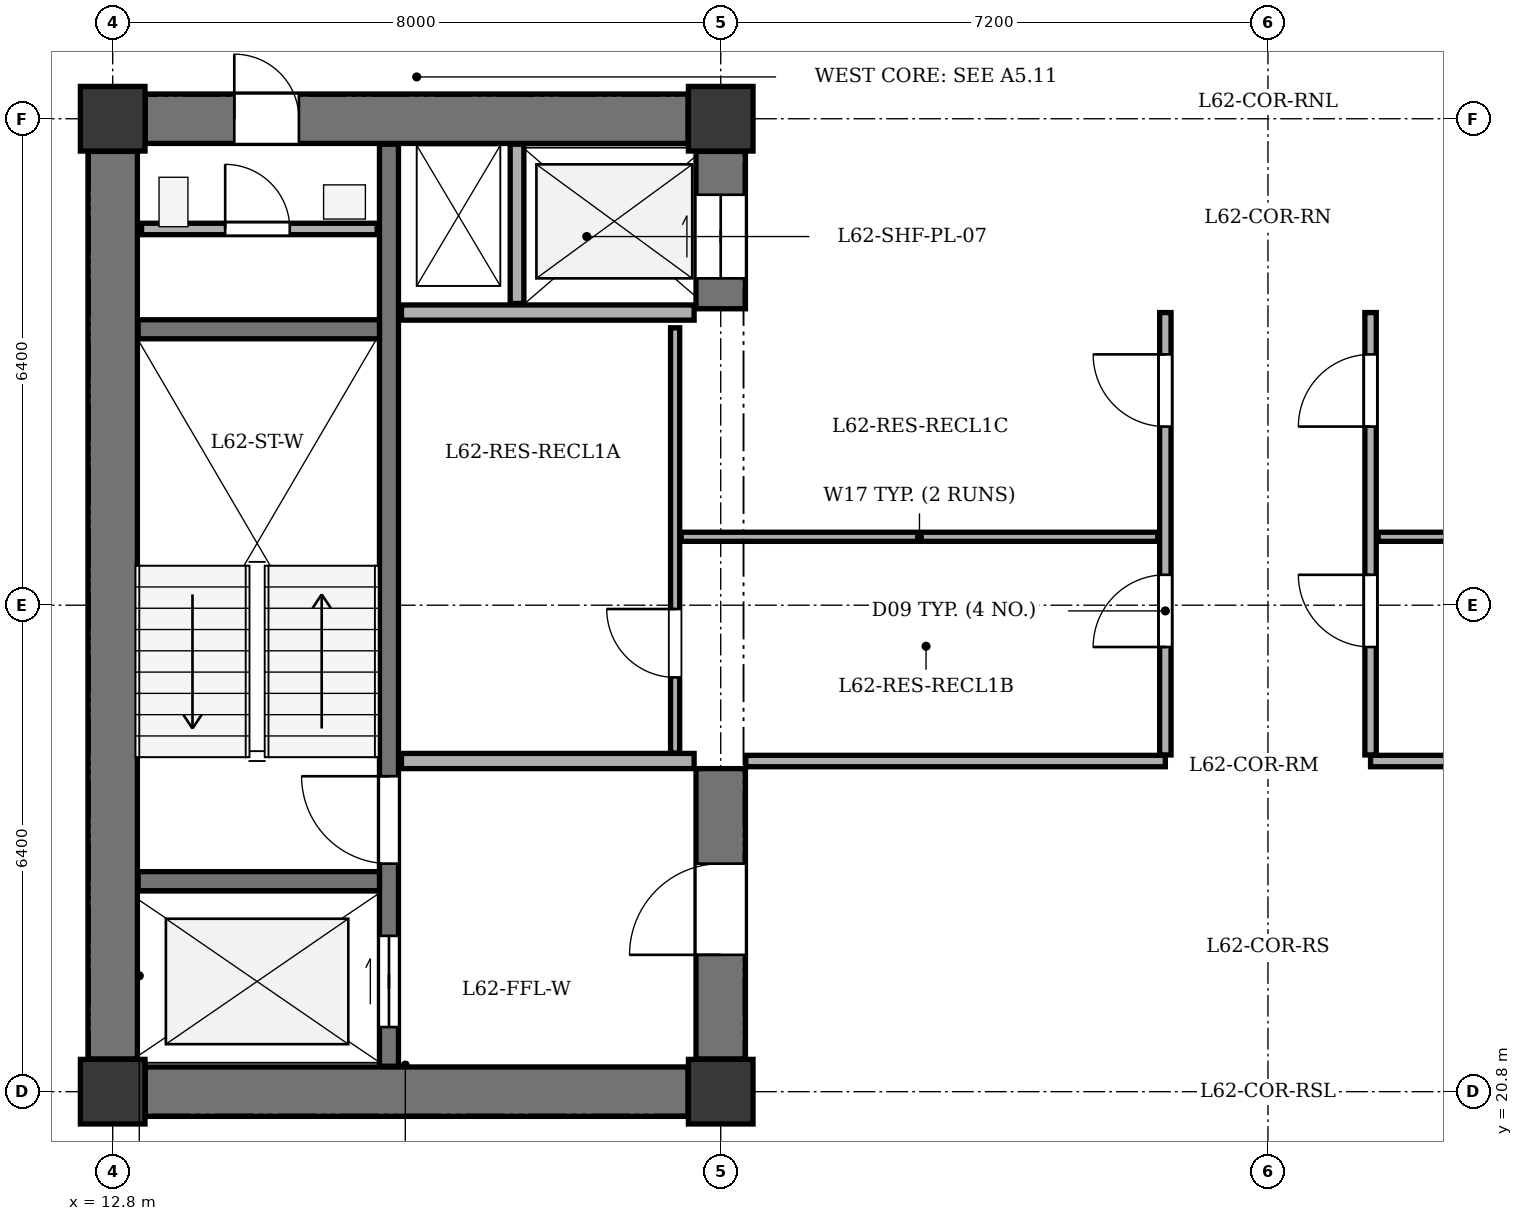
"""IFC4 building model, lengths in metres.
Left out: names, types, materials, properties, quantities, classifications, styles, units other than length and angle.
Written with IfcOpenShell. Run it as: python <this file> out.ifc"""

import sys

from ifc_helpers import new_model, si_unit, direction, frame, frame_2d, origin, origin_2d, place, context, subcontext, project, spatial, rectangle, extrude, element, fill, save


model = new_model("IFC4")
c1 = context("Model", 3, precision=1e-05, world=origin(), true_north=direction((0.0, 1.0)))
c2 = subcontext(c1, "Body", "Model", "MODEL_VIEW")
j1 = project(units=[si_unit("LENGTHUNIT", "METRE"), si_unit("PLANEANGLEUNIT", "RADIAN")], contexts=[c1])
p1 = place(None, origin())
s1 = spatial("IfcSite", under=j1, at=p1, CompositionType="ELEMENT")
p2 = place(p1, origin())
s2 = spatial("IfcBuilding", under=s1, at=p2, CompositionType="ELEMENT")
p3 = place(p2, frame((0.0, 0.0, 238.1)))
s3 = spatial("IfcBuildingStorey", under=s2, at=p3, CompositionType="ELEMENT", Elevation=238.1)
for number, where, z_axis, x_axis in (
    (1, (12.8, 20.8, 0.0), (0.0, 0.0, 1.0), (1.0, 0.0, 0.0)),
    (2, (20.8, 20.8, 0.0), (0.0, 0.0, 1.0), (1.0, 0.0, 0.0)),
    (3, (12.8, 33.6, 0.0), (0.0, 0.0, 1.0), (1.0, 0.0, 0.0)),
    (4, (20.8, 33.6, 0.0), (0.0, 0.0, 1.0), (1.0, 0.0, 0.0)),
):
    element("IfcColumn", number, at=place(p3, frame(where, z_axis=z_axis, x_axis=x_axis)), inside=s3, PredefinedType="COLUMN", context=c2, shape_type="SweptSolid", body=[
        extrude(rectangle(XDim=0.85, YDim=0.85, at=origin_2d()), origin(), (0.0, 0.0, 1.0), 3.4),
    ])
p4 = place(p3, frame((12.8, 21.23, 0.0), z_axis=(0.0, 0.0, 1.0), x_axis=(0.0, 1.0, 0.0)))
e5 = element("IfcWall", 5, at=p4, inside=s3, PredefinedType="SHEAR", context=c2, shape_type="SweptSolid", body=[
    extrude(rectangle(XDim=11.94, YDim=0.65, at=frame_2d((5.97, 0.0))), origin(), (0.0, 0.0, 1.0), 3.1),
])
p5 = place(p3, frame((13.23, 20.8, 0.0), z_axis=(0.0, 0.0, 1.0), x_axis=(1.0, 0.0, 0.0)))
e6 = element("IfcWall", 6, at=p5, inside=s3, PredefinedType="SHEAR", context=c2, shape_type="SweptSolid", body=[
    extrude(rectangle(XDim=7.14, YDim=0.65, at=frame_2d((3.57, 0.0))), origin(), (0.0, 0.0, 1.0), 3.1),
])
p6 = place(p3, frame((13.23, 33.6, 0.0), z_axis=(0.0, 0.0, 1.0), x_axis=(1.0, 0.0, 0.0)))
e7 = element("IfcWall", 7, at=p6, inside=s3, PredefinedType="SHEAR", context=c2, shape_type="SweptSolid", body=[
    extrude(rectangle(XDim=7.14, YDim=0.65, at=frame_2d((3.57, 0.0))), origin(), (0.0, 0.0, 1.0), 3.1),
])
p7 = place(p6, frame((1.17, 0.0, 0.0)))
e8 = element("IfcOpeningElement", 8, at=p7, cuts=e7, PredefinedType="OPENING", context=c2, shape_type="SweptSolid", body=[
    extrude(rectangle(XDim=0.85, YDim=2.02, at=frame_2d((0.425, 1.01))), frame((0.0, 0.335, 0.0), z_axis=(0.0, -1.0, 0.0), x_axis=(1.0, 0.0, 0.0)), (0.0, 0.0, 1.0), 0.67),
])
p8 = place(p3, frame((20.8, 21.23, 0.0), z_axis=(0.0, 0.0, 1.0), x_axis=(0.0, 1.0, 0.0)))
e9 = element("IfcWall", 9, at=p8, inside=s3, PredefinedType="SHEAR", context=c2, shape_type="SweptSolid", body=[
    extrude(rectangle(XDim=3.82, YDim=0.65, at=frame_2d((1.91, 0.0))), origin(), (0.0, 0.0, 1.0), 3.1),
])
p9 = place(p8, frame((1.37, 0.0, 0.0)))
e10 = element("IfcOpeningElement", 10, at=p9, cuts=e9, PredefinedType="OPENING", context=c2, shape_type="SweptSolid", body=[
    extrude(rectangle(XDim=1.2, YDim=2.15, at=frame_2d((0.6, 1.075))), frame((0.0, 0.335, 0.0), z_axis=(0.0, -1.0, 0.0), x_axis=(1.0, 0.0, 0.0)), (0.0, 0.0, 1.0), 0.67),
])
p10 = place(p3, frame((20.8, 31.1, 0.0), z_axis=(0.0, 0.0, 1.0), x_axis=(0.0, 1.0, 0.0)))
e11 = element("IfcWall", 11, at=p10, inside=s3, PredefinedType="SHEAR", context=c2, shape_type="SweptSolid", body=[
    extrude(rectangle(XDim=2.07, YDim=0.65, at=frame_2d((1.035, 0.0))), origin(), (0.0, 0.0, 1.0), 3.1),
])
p11 = place(p10, frame((0.4, 0.0, 0.0)))
e12 = element("IfcOpeningElement", 12, at=p11, cuts=e11, PredefinedType="OPENING", context=c2, shape_type="SweptSolid", body=[
    extrude(rectangle(XDim=1.1, YDim=2.1, at=frame_2d((0.55, 1.05))), frame((0.0, 0.335, 0.0), z_axis=(0.0, -1.0, 0.0), x_axis=(1.0, 0.0, 0.0)), (0.0, 0.0, 1.0), 0.67),
])
p12 = place(p3, frame((16.435, 21.135, 0.0), z_axis=(0.0, 0.0, 1.0), x_axis=(0.0, 1.0, 0.0)))
e13 = element("IfcWall", 13, at=p12, inside=s3, PredefinedType="SHEAR", context=c2, shape_type="SweptSolid", body=[
    extrude(rectangle(XDim=12.13, YDim=0.25, at=frame_2d((6.065, 0.0))), origin(), (0.0, 0.0, 1.0), 3.1),
])
p13 = place(p12, frame((0.515, 0.0, 0.0)))
e14 = element("IfcOpeningElement", 14, at=p13, cuts=e13, PredefinedType="OPENING", context=c2, shape_type="SweptSolid", body=[
    extrude(rectangle(XDim=1.2, YDim=2.15, at=frame_2d((0.6, 1.075))), frame((0.0, 0.135, 0.0), z_axis=(0.0, -1.0, 0.0), x_axis=(1.0, 0.0, 0.0)), (0.0, 0.0, 1.0), 0.27),
])
p14 = place(p12, frame((2.665, 0.0, 0.0)))
e15 = element("IfcOpeningElement", 15, at=p14, cuts=e13, PredefinedType="OPENING", context=c2, shape_type="SweptSolid", body=[
    extrude(rectangle(XDim=1.15, YDim=2.15, at=frame_2d((0.575, 1.075))), frame((0.0, 0.135, 0.0), z_axis=(0.0, -1.0, 0.0), x_axis=(1.0, 0.0, 0.0)), (0.0, 0.0, 1.0), 0.27),
])
for number, where, z_axis, x_axis in (
    (16, (13.135, 23.57, 0.0), (0.0, 0.0, 1.0), (1.0, 0.0, 0.0)),
    (17, (13.135, 30.83, 0.0), (0.0, 0.0, 1.0), (1.0, 0.0, 0.0)),
):
    element("IfcWall", number, at=place(p3, frame(where, z_axis=z_axis, x_axis=x_axis)), inside=s3, PredefinedType="SHEAR", context=c2, shape_type="SweptSolid", body=[
        extrude(rectangle(XDim=3.175, YDim=0.25, at=frame_2d((1.587, 0.0))), origin(), (0.0, 0.0, 1.0), 3.1),
    ])
for number, where, z_axis, x_axis in (
    (18, (16.6, 25.15, 0.0), (0.0, 0.0, 1.0), (1.0, 0.0, 0.0)),
    (19, (16.6, 31.05, 0.0), (0.0, 0.0, 1.0), (1.0, 0.0, 0.0)),
):
    element("IfcWall", number, at=place(p3, frame(where, z_axis=z_axis, x_axis=x_axis)), inside=s3, PredefinedType="SOLIDWALL", context=c2, shape_type="SweptSolid", body=[
        extrude(rectangle(XDim=3.85, YDim=0.2, at=frame_2d((1.925, 0.0))), origin(), (0.0, 0.0, 1.0), 3.1),
    ])
p15 = place(p3, frame((18.12, 31.17, 0.0), z_axis=(0.0, 0.0, 1.0), x_axis=(0.0, 1.0, 0.0)))
e20 = element("IfcWall", 20, at=p15, inside=s3, PredefinedType="PARTITIONING", context=c2, shape_type="SweptSolid", body=[
    extrude(rectangle(XDim=2.095, YDim=0.18, at=frame_2d((1.047, 0.0))), origin(), (0.0, 0.0, 1.0), 3.1),
])
p16 = place(p3, frame((13.18, 32.15, 0.0), z_axis=(0.0, 0.0, 1.0), x_axis=(1.0, 0.0, 0.0)))
e21 = element("IfcWall", 21, at=p16, inside=s3, PredefinedType="PARTITIONING", context=c2, shape_type="SweptSolid", body=[
    extrude(rectangle(XDim=3.1, YDim=0.15, at=frame_2d((1.55, 0.0))), origin(), (0.0, 0.0, 1.0), 3.1),
])
p17 = place(p16, frame((1.1, 0.0, 0.0)))
e22 = element("IfcOpeningElement", 22, at=p17, cuts=e21, PredefinedType="OPENING", context=c2, shape_type="SweptSolid", body=[
    extrude(rectangle(XDim=0.85, YDim=2.02, at=frame_2d((0.425, 1.01))), frame((0.0, 0.085, 0.0), z_axis=(0.0, -1.0, 0.0), x_axis=(1.0, 0.0, 0.0)), (0.0, 0.0, 1.0), 0.17),
])
for number, where, z_axis, x_axis in (
    (23, (21.13, 25.15, 0.0), (0.0, 0.0, 1.0), (1.0, 0.0, 0.0)),
    (24, (29.35, 25.15, 0.0), (0.0, 0.0, 1.0), (1.0, 0.0, 0.0)),
):
    element("IfcWall", number, at=place(p3, frame(where, z_axis=z_axis, x_axis=x_axis)), inside=s3, PredefinedType="PARTITIONING", context=c2, shape_type="SweptSolid", body=[
        extrude(rectangle(XDim=5.52, YDim=0.15, at=frame_2d((2.76, 0.0))), origin(), (0.0, 0.0, 1.0), 3.1),
    ])
p18 = place(p3, frame((26.65, 25.23, 0.0), z_axis=(0.0, 0.0, 1.0), x_axis=(0.0, 1.0, 0.0)))
e25 = element("IfcWall", 25, at=p18, inside=s3, PredefinedType="PARTITIONING", context=c2, shape_type="SweptSolid", body=[
    extrude(rectangle(XDim=5.82, YDim=0.15, at=frame_2d((2.91, 0.0))), origin(), (0.0, 0.0, 1.0), 3.1),
])
p19 = place(p18, frame((1.42, 0.0, 0.0)))
e26 = element("IfcOpeningElement", 26, at=p19, cuts=e25, PredefinedType="OPENING", context=c2, shape_type="SweptSolid", body=[
    extrude(rectangle(XDim=0.95, YDim=2.1, at=frame_2d((0.475, 1.05))), frame((0.0, 0.085, 0.0), z_axis=(0.0, -1.0, 0.0), x_axis=(1.0, 0.0, 0.0)), (0.0, 0.0, 1.0), 0.17),
])
p20 = place(p18, frame((4.32, 0.0, 0.0)))
e27 = element("IfcOpeningElement", 27, at=p20, cuts=e25, PredefinedType="OPENING", context=c2, shape_type="SweptSolid", body=[
    extrude(rectangle(XDim=0.95, YDim=2.1, at=frame_2d((0.475, 1.05))), frame((0.0, 0.085, 0.0), z_axis=(0.0, -1.0, 0.0), x_axis=(1.0, 0.0, 0.0)), (0.0, 0.0, 1.0), 0.17),
])
p21 = place(p3, frame((20.2, 25.255, 0.0), z_axis=(0.0, 0.0, 1.0), x_axis=(0.0, 1.0, 0.0)))
e28 = element("IfcWall", 28, at=p21, inside=s3, PredefinedType="PARTITIONING", context=c2, shape_type="SweptSolid", body=[
    extrude(rectangle(XDim=5.595, YDim=0.12, at=frame_2d((2.798, 0.0))), origin(), (0.0, 0.0, 1.0), 3.1),
])
p22 = place(p21, frame((0.995, 0.0, 0.0)))
e29 = element("IfcOpeningElement", 29, at=p22, cuts=e28, PredefinedType="OPENING", context=c2, shape_type="SweptSolid", body=[
    extrude(rectangle(XDim=0.9, YDim=2.05, at=frame_2d((0.45, 1.025))), frame((0.0, 0.07, 0.0), z_axis=(0.0, -1.0, 0.0), x_axis=(1.0, 0.0, 0.0)), (0.0, 0.0, 1.0), 0.14),
])
p23 = place(p3, frame((20.28, 28.1, 0.0), z_axis=(0.0, 0.0, 1.0), x_axis=(1.0, 0.0, 0.0)))
e30 = element("IfcWall", 30, at=p23, inside=s3, PredefinedType="PARTITIONING", context=c2, shape_type="SweptSolid", body=[
    extrude(rectangle(XDim=6.27, YDim=0.12, at=frame_2d((3.135, 0.0))), origin(), (0.0, 0.0, 1.0), 3.1),
])
p24 = place(p3, frame((29.35, 25.23, 0.0), z_axis=(0.0, 0.0, 1.0), x_axis=(0.0, 1.0, 0.0)))
e31 = element("IfcWall", 31, at=p24, inside=s3, PredefinedType="PARTITIONING", context=c2, shape_type="SweptSolid", body=[
    extrude(rectangle(XDim=5.82, YDim=0.15, at=frame_2d((2.91, 0.0))), origin(), (0.0, 0.0, 1.0), 3.1),
])
p25 = place(p24, frame((1.42, 0.0, 0.0)))
e32 = element("IfcOpeningElement", 32, at=p25, cuts=e31, PredefinedType="OPENING", context=c2, shape_type="SweptSolid", body=[
    extrude(rectangle(XDim=0.95, YDim=2.1, at=frame_2d((0.475, 1.05))), frame((0.0, 0.085, 0.0), z_axis=(0.0, -1.0, 0.0), x_axis=(1.0, 0.0, 0.0)), (0.0, 0.0, 1.0), 0.17),
])
p26 = place(p24, frame((4.32, 0.0, 0.0)))
e33 = element("IfcOpeningElement", 33, at=p26, cuts=e31, PredefinedType="OPENING", context=c2, shape_type="SweptSolid", body=[
    extrude(rectangle(XDim=0.95, YDim=2.1, at=frame_2d((0.475, 1.05))), frame((0.0, 0.085, 0.0), z_axis=(0.0, -1.0, 0.0), x_axis=(1.0, 0.0, 0.0)), (0.0, 0.0, 1.0), 0.17),
])
p27 = place(p3, frame((29.45, 28.1, 0.0), z_axis=(0.0, 0.0, 1.0), x_axis=(1.0, 0.0, 0.0)))
e34 = element("IfcWall", 34, at=p27, inside=s3, PredefinedType="PARTITIONING", context=c2, shape_type="SweptSolid", body=[
    extrude(rectangle(XDim=5.27, YDim=0.12, at=frame_2d((2.635, 0.0))), origin(), (0.0, 0.0, 1.0), 3.1),
])
p28 = place(p7, origin())
e35 = element("IfcDoor", 35, at=p28, inside=s3, OperationType="SINGLE_SWING_LEFT", PredefinedType="DOOR", context=c2, shape_type="SweptSolid", body=[
    extrude(rectangle(XDim=0.85, YDim=2.02, at=frame_2d((0.425, 1.01))), frame((0.0, 0.025, 0.0), z_axis=(0.0, -1.0, 0.0), x_axis=(1.0, 0.0, 0.0)), (0.0, 0.0, 1.0), 0.05),
])
fill(e8, e35)
p29 = place(p9, origin())
e36 = element("IfcDoor", 36, at=p29, inside=s3, OperationType="SINGLE_SWING_LEFT", PredefinedType="DOOR", context=c2, shape_type="SweptSolid", body=[
    extrude(rectangle(XDim=1.2, YDim=2.15, at=frame_2d((0.6, 1.075))), frame((0.0, 0.025, 0.0), z_axis=(0.0, -1.0, 0.0), x_axis=(1.0, 0.0, 0.0)), (0.0, 0.0, 1.0), 0.05),
])
fill(e10, e36)
p30 = place(p11, origin())
e37 = element("IfcDoor", 37, at=p30, inside=s3, OperationType="DOUBLE_DOOR_SLIDING", PredefinedType="DOOR", context=c2, shape_type="SweptSolid", body=[
    extrude(rectangle(XDim=1.1, YDim=2.1, at=frame_2d((0.55, 1.05))), frame((0.0, 0.025, 0.0), z_axis=(0.0, -1.0, 0.0), x_axis=(1.0, 0.0, 0.0)), (0.0, 0.0, 1.0), 0.05),
])
fill(e12, e37)
p31 = place(p13, origin())
e38 = element("IfcDoor", 38, at=p31, inside=s3, OperationType="DOUBLE_DOOR_SLIDING", PredefinedType="DOOR", context=c2, shape_type="SweptSolid", body=[
    extrude(rectangle(XDim=1.2, YDim=2.15, at=frame_2d((0.6, 1.075))), frame((0.0, 0.025, 0.0), z_axis=(0.0, -1.0, 0.0), x_axis=(1.0, 0.0, 0.0)), (0.0, 0.0, 1.0), 0.05),
])
fill(e14, e38)
p32 = place(p14, origin())
e39 = element("IfcDoor", 39, at=p32, inside=s3, OperationType="SINGLE_SWING_RIGHT", PredefinedType="DOOR", context=c2, shape_type="SweptSolid", body=[
    extrude(rectangle(XDim=1.15, YDim=2.15, at=frame_2d((0.575, 1.075))), frame((0.0, 0.025, 0.0), z_axis=(0.0, -1.0, 0.0), x_axis=(1.0, 0.0, 0.0)), (0.0, 0.0, 1.0), 0.05),
])
fill(e15, e39)
p33 = place(p17, origin())
e40 = element("IfcDoor", 40, at=p33, inside=s3, OperationType="SINGLE_SWING_LEFT", PredefinedType="DOOR", context=c2, shape_type="SweptSolid", body=[
    extrude(rectangle(XDim=0.85, YDim=2.02, at=frame_2d((0.425, 1.01))), frame((0.0, 0.025, 0.0), z_axis=(0.0, -1.0, 0.0), x_axis=(1.0, 0.0, 0.0)), (0.0, 0.0, 1.0), 0.05),
])
fill(e22, e40)
p34 = place(p22, origin())
e41 = element("IfcDoor", 41, at=p34, inside=s3, OperationType="SINGLE_SWING_RIGHT", PredefinedType="DOOR", context=c2, shape_type="SweptSolid", body=[
    extrude(rectangle(XDim=0.9, YDim=2.05, at=frame_2d((0.45, 1.025))), frame((0.0, 0.025, 0.0), z_axis=(0.0, -1.0, 0.0), x_axis=(1.0, 0.0, 0.0)), (0.0, 0.0, 1.0), 0.05),
])
fill(e29, e41)
p35 = place(p19, origin())
e42 = element("IfcDoor", 42, at=p35, inside=s3, OperationType="SINGLE_SWING_LEFT", PredefinedType="DOOR", context=c2, shape_type="SweptSolid", body=[
    extrude(rectangle(XDim=0.95, YDim=2.1, at=frame_2d((0.475, 1.05))), frame((0.0, 0.025, 0.0), z_axis=(0.0, -1.0, 0.0), x_axis=(1.0, 0.0, 0.0)), (0.0, 0.0, 1.0), 0.05),
])
fill(e26, e42)
p36 = place(p20, origin())
e43 = element("IfcDoor", 43, at=p36, inside=s3, OperationType="SINGLE_SWING_RIGHT", PredefinedType="DOOR", context=c2, shape_type="SweptSolid", body=[
    extrude(rectangle(XDim=0.95, YDim=2.1, at=frame_2d((0.475, 1.05))), frame((0.0, 0.025, 0.0), z_axis=(0.0, -1.0, 0.0), x_axis=(1.0, 0.0, 0.0)), (0.0, 0.0, 1.0), 0.05),
])
fill(e27, e43)
p37 = place(p25, origin())
e44 = element("IfcDoor", 44, at=p37, inside=s3, OperationType="SINGLE_SWING_RIGHT", PredefinedType="DOOR", context=c2, shape_type="SweptSolid", body=[
    extrude(rectangle(XDim=0.95, YDim=2.1, at=frame_2d((0.475, 1.05))), frame((0.0, 0.025, 0.0), z_axis=(0.0, -1.0, 0.0), x_axis=(1.0, 0.0, 0.0)), (0.0, 0.0, 1.0), 0.05),
])
fill(e32, e44)
p38 = place(p26, origin())
e45 = element("IfcDoor", 45, at=p38, inside=s3, OperationType="SINGLE_SWING_LEFT", PredefinedType="DOOR", context=c2, shape_type="SweptSolid", body=[
    extrude(rectangle(XDim=0.95, YDim=2.1, at=frame_2d((0.475, 1.05))), frame((0.0, 0.025, 0.0), z_axis=(0.0, -1.0, 0.0), x_axis=(1.0, 0.0, 0.0)), (0.0, 0.0, 1.0), 0.05),
])
fill(e33, e45)
save(model, sys.argv[1])
